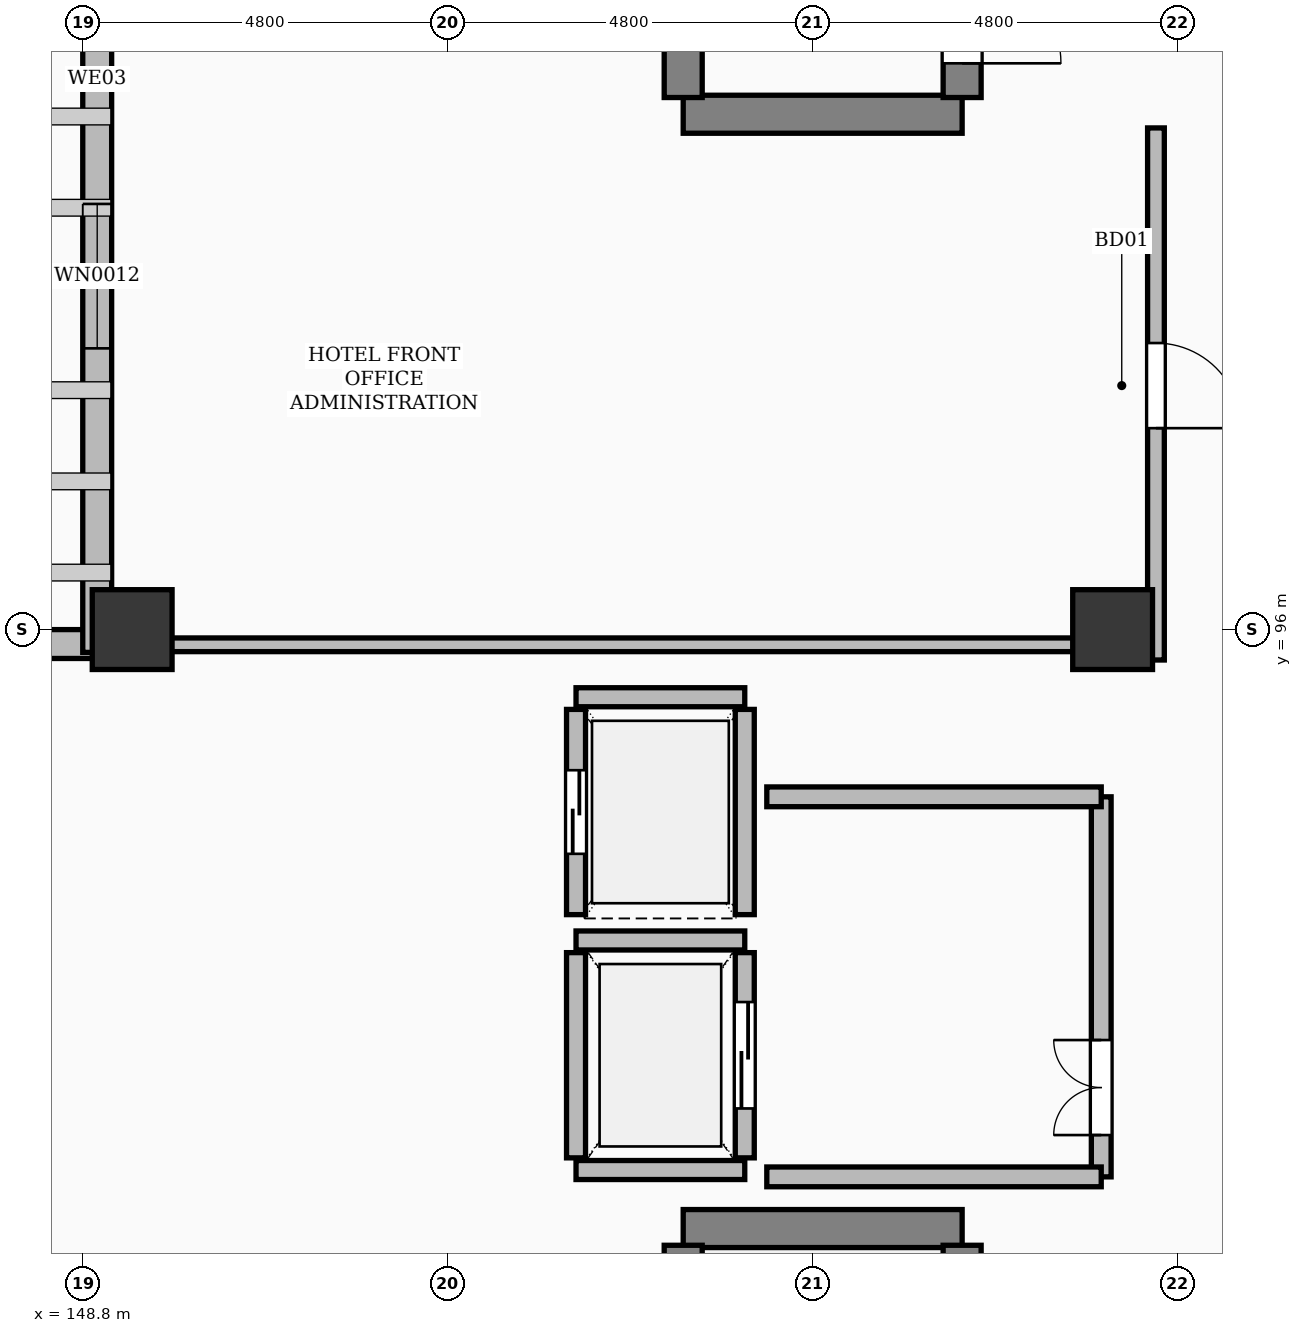
"""IFC4 building model, lengths in metres.
Left out: names, types, materials, properties, quantities, classifications, styles, units other than length and angle.
Written with IfcOpenShell. Run it as: python <this file> out.ifc"""

import sys

from ifc_helpers import new_model, si_unit, direction, frame, frame_2d, origin, origin_2d, place, context, subcontext, project, spatial, rectangle, extrude, element, fill, save


model = new_model("IFC4")
c1 = context("Model", 3, precision=1e-05, world=origin(), true_north=direction((0.0, 1.0)))
c2 = subcontext(c1, "Body", "Model", "MODEL_VIEW")
j1 = project(units=[si_unit("LENGTHUNIT", "METRE"), si_unit("PLANEANGLEUNIT", "RADIAN")], contexts=[c1])
p1 = place(None, origin())
s1 = spatial("IfcSite", under=j1, at=p1, CompositionType="ELEMENT")
p2 = place(p1, origin())
s2 = spatial("IfcBuilding", under=s1, at=p2, CompositionType="ELEMENT")
p3 = place(p2, origin())
s3 = spatial("IfcBuildingStorey", under=s2, at=p3, CompositionType="ELEMENT", Elevation=0.0)
for number, where, z_axis, x_axis in (
    (1, (149.45, 96.0, 0.0), (0.0, 0.0, 1.0), (1.0, 0.0, 0.0)),
    (2, (162.35, 96.0, 0.0), (0.0, 0.0, 1.0), (1.0, 0.0, 0.0)),
):
    element("IfcColumn", number, at=place(p3, frame(where, z_axis=z_axis, x_axis=x_axis)), inside=s3, PredefinedType="COLUMN", context=c2, shape_type="SweptSolid", body=[
        extrude(rectangle(XDim=1.05, YDim=1.05, at=origin_2d()), origin(), (0.0, 0.0, 1.0), 6.0),
    ])
p4 = place(p3, frame((124.8, 95.81, 0.0), z_axis=(0.0, 0.0, 1.0), x_axis=(1.0, 0.0, 0.0)))
e3 = element("IfcWall", 3, at=p4, inside=s3, PredefinedType="SOLIDWALL", context=c2, shape_type="SweptSolid", body=[
    extrude(rectangle(XDim=24.3, YDim=0.38, at=frame_2d((12.15, 0.0))), origin(), (0.0, 0.0, 1.0), 4.692),
])
p5 = place(p4, frame((3.6, 0.0, 0.0)))
e4 = element("IfcOpeningElement", 4, at=p5, cuts=e3, PredefinedType="OPENING", context=c2, shape_type="SweptSolid", body=[
    extrude(rectangle(XDim=2.3, YDim=2.4, at=frame_2d((1.15, 1.2))), frame((0.0, 0.202, 0.0), z_axis=(0.0, -1.0, 0.0), x_axis=(1.0, 0.0, 0.0)), (0.0, 0.0, 1.0), 0.404),
])
p6 = place(p4, frame((16.2, 0.0, 0.0)))
e5 = element("IfcOpeningElement", 5, at=p6, cuts=e3, PredefinedType="OPENING", context=c2, shape_type="SweptSolid", body=[
    extrude(rectangle(XDim=2.3, YDim=2.4, at=frame_2d((1.15, 1.2))), frame((0.0, 0.202, 0.0), z_axis=(0.0, -1.0, 0.0), x_axis=(1.0, 0.0, 0.0)), (0.0, 0.0, 1.0), 0.404),
])
p7 = place(p3, frame((148.99, 95.7, 0.0), z_axis=(0.0, 0.0, 1.0), x_axis=(0.0, 1.0, 0.0)))
e6 = element("IfcWall", 6, at=p7, inside=s3, PredefinedType="SOLIDWALL", context=c2, shape_type="SweptSolid", body=[
    extrude(rectangle(XDim=30.2, YDim=0.38, at=frame_2d((15.1, 0.0))), origin(), (0.0, 0.0, 1.0), 4.692),
])
p8 = place(p7, frame((4.0, 0.0, 0.85)))
e7 = element("IfcOpeningElement", 7, at=p8, cuts=e6, PredefinedType="OPENING", context=c2, shape_type="SweptSolid", body=[
    extrude(rectangle(XDim=1.9, YDim=2.9, at=frame_2d((0.95, 1.45))), frame((0.0, 0.202, 0.0), z_axis=(0.0, -1.0, 0.0), x_axis=(1.0, 0.0, 0.0)), (0.0, 0.0, 1.0), 0.404),
])
p9 = place(p7, frame((13.6, 0.0, 0.85)))
e8 = element("IfcOpeningElement", 8, at=p9, cuts=e6, PredefinedType="OPENING", context=c2, shape_type="SweptSolid", body=[
    extrude(rectangle(XDim=1.9, YDim=2.9, at=frame_2d((0.95, 1.45))), frame((0.0, 0.202, 0.0), z_axis=(0.0, -1.0, 0.0), x_axis=(1.0, 0.0, 0.0)), (0.0, 0.0, 1.0), 0.404),
])
p10 = place(p7, frame((23.2, 0.0, 0.85)))
e9 = element("IfcOpeningElement", 9, at=p10, cuts=e6, PredefinedType="OPENING", context=c2, shape_type="SweptSolid", body=[
    extrude(rectangle(XDim=1.9, YDim=2.9, at=frame_2d((0.95, 1.45))), frame((0.0, 0.202, 0.0), z_axis=(0.0, -1.0, 0.0), x_axis=(1.0, 0.0, 0.0)), (0.0, 0.0, 1.0), 0.404),
])
p11 = place(p3, frame((156.7, 88.12, 0.0), z_axis=(0.0, 0.0, 1.0), x_axis=(1.0, 0.0, 0.0)))
e10 = element("IfcWall", 10, at=p11, inside=s3, PredefinedType="SHEAR", context=c2, shape_type="SweptSolid", body=[
    extrude(rectangle(XDim=3.67, YDim=0.5, at=frame_2d((1.835, 0.0))), origin(), (0.0, 0.0, 1.0), 5.7),
])
p12 = place(p3, frame((156.7, 77.4, 0.0), z_axis=(0.0, 0.0, 1.0), x_axis=(0.0, 1.0, 0.0)))
e11 = element("IfcWall", 11, at=p12, inside=s3, PredefinedType="SHEAR", context=c2, shape_type="SweptSolid", body=[
    extrude(rectangle(XDim=10.5, YDim=0.5, at=frame_2d((5.25, 0.0))), origin(), (0.0, 0.0, 1.0), 5.7),
])
p13 = place(p3, frame((160.37, 77.4, 0.0), z_axis=(0.0, 0.0, 1.0), x_axis=(0.0, 1.0, 0.0)))
e12 = element("IfcWall", 12, at=p13, inside=s3, PredefinedType="SHEAR", context=c2, shape_type="SweptSolid", body=[
    extrude(rectangle(XDim=10.5, YDim=0.5, at=frame_2d((5.25, 0.0))), origin(), (0.0, 0.0, 1.0), 5.7),
])
p14 = place(p13, frame((0.45, 0.0, 0.0)))
e13 = element("IfcOpeningElement", 13, at=p14, cuts=e12, PredefinedType="OPENING", context=c2, shape_type="SweptSolid", body=[
    extrude(rectangle(XDim=1.3, YDim=2.15, at=frame_2d((0.65, 1.075))), frame((0.0, 0.262, 0.0), z_axis=(0.0, -1.0, 0.0), x_axis=(1.0, 0.0, 0.0)), (0.0, 0.0, 1.0), 0.524),
])
for number, where, z_axis, x_axis in (
    (14, (155.29, 88.89, 0.0), (0.0, 0.0, 1.0), (1.0, 0.0, 0.0)),
    (15, (155.29, 91.91, 0.0), (0.0, 0.0, 1.0), (1.0, 0.0, 0.0)),
):
    element("IfcWall", number, at=place(p3, frame(where, z_axis=z_axis, x_axis=x_axis)), inside=s3, PredefinedType="SOLIDWALL", context=c2, shape_type="SweptSolid", body=[
        extrude(rectangle(XDim=2.22, YDim=0.25, at=frame_2d((1.11, 0.0))), origin(), (0.0, 0.0, 1.0), 5.7),
    ])
p15 = place(p3, frame((155.29, 89.05, 0.0), z_axis=(0.0, 0.0, 1.0), x_axis=(0.0, 1.0, 0.0)))
e16 = element("IfcWall", 16, at=p15, inside=s3, PredefinedType="SOLIDWALL", context=c2, shape_type="SweptSolid", body=[
    extrude(rectangle(XDim=2.7, YDim=0.25, at=frame_2d((1.35, 0.0))), origin(), (0.0, 0.0, 1.0), 5.7),
])
p16 = place(p3, frame((157.51, 89.05, 0.0), z_axis=(0.0, 0.0, 1.0), x_axis=(0.0, 1.0, 0.0)))
e17 = element("IfcWall", 17, at=p16, inside=s3, PredefinedType="SOLIDWALL", context=c2, shape_type="SweptSolid", body=[
    extrude(rectangle(XDim=2.7, YDim=0.25, at=frame_2d((1.35, 0.0))), origin(), (0.0, 0.0, 1.0), 5.7),
])
p17 = place(p16, frame((0.65, 0.0, 0.0)))
e18 = element("IfcOpeningElement", 18, at=p17, cuts=e17, PredefinedType="OPENING", context=c2, shape_type="SweptSolid", body=[
    extrude(rectangle(XDim=1.4, YDim=2.3, at=frame_2d((0.7, 1.15))), frame((0.0, 0.137, 0.0), z_axis=(0.0, -1.0, 0.0), x_axis=(1.0, 0.0, 0.0)), (0.0, 0.0, 1.0), 0.274),
])
p18 = place(p3, frame((155.29, 95.11, 0.0), z_axis=(0.0, 0.0, 1.0), x_axis=(1.0, 0.0, 0.0)))
e19 = element("IfcWall", 19, at=p18, inside=s3, PredefinedType="SOLIDWALL", context=c2, shape_type="SweptSolid", body=[
    extrude(rectangle(XDim=2.22, YDim=0.25, at=frame_2d((1.11, 0.0))), origin(), (0.0, 0.0, 1.0), 5.7),
])
p19 = place(p3, frame((155.29, 92.25, 0.0), z_axis=(0.0, 0.0, 1.0), x_axis=(0.0, 1.0, 0.0)))
e20 = element("IfcWall", 20, at=p19, inside=s3, PredefinedType="SOLIDWALL", context=c2, shape_type="SweptSolid", body=[
    extrude(rectangle(XDim=2.7, YDim=0.25, at=frame_2d((1.35, 0.0))), origin(), (0.0, 0.0, 1.0), 5.7),
])
p20 = place(p19, frame((0.8, 0.0, 0.0)))
e21 = element("IfcOpeningElement", 21, at=p20, cuts=e20, PredefinedType="OPENING", context=c2, shape_type="SweptSolid", body=[
    extrude(rectangle(XDim=1.1, YDim=2.2, at=frame_2d((0.55, 1.1))), frame((0.0, 0.137, 0.0), z_axis=(0.0, -1.0, 0.0), x_axis=(1.0, 0.0, 0.0)), (0.0, 0.0, 1.0), 0.274),
])
p21 = place(p3, frame((157.51, 92.25, 0.0), z_axis=(0.0, 0.0, 1.0), x_axis=(0.0, 1.0, 0.0)))
e22 = element("IfcWall", 22, at=p21, inside=s3, PredefinedType="SOLIDWALL", context=c2, shape_type="SweptSolid", body=[
    extrude(rectangle(XDim=2.7, YDim=0.25, at=frame_2d((1.35, 0.0))), origin(), (0.0, 0.0, 1.0), 5.7),
])
p22 = place(p3, frame((162.2, 88.8, 0.0), z_axis=(0.0, 0.0, 1.0), x_axis=(0.0, 1.0, 0.0)))
e23 = element("IfcWall", 23, at=p22, inside=s3, PredefinedType="SOLIDWALL", context=c2, shape_type="SweptSolid", body=[
    extrude(rectangle(XDim=5.0, YDim=0.26, at=frame_2d((2.5, 0.0))), origin(), (0.0, 0.0, 1.0), 4.692),
])
p23 = place(p22, frame((0.55, 0.0, 0.0)))
e24 = element("IfcOpeningElement", 24, at=p23, cuts=e23, PredefinedType="OPENING", context=c2, shape_type="SweptSolid", body=[
    extrude(rectangle(XDim=1.25, YDim=2.15, at=frame_2d((0.625, 1.075))), frame((0.0, 0.142, 0.0), z_axis=(0.0, -1.0, 0.0), x_axis=(1.0, 0.0, 0.0)), (0.0, 0.0, 1.0), 0.284),
])
for number, where, z_axis, x_axis in (
    (25, (157.8, 88.8, 0.0), (0.0, 0.0, 1.0), (1.0, 0.0, 0.0)),
    (26, (157.8, 93.8, 0.0), (0.0, 0.0, 1.0), (1.0, 0.0, 0.0)),
):
    element("IfcWall", number, at=place(p3, frame(where, z_axis=z_axis, x_axis=x_axis)), inside=s3, PredefinedType="SOLIDWALL", context=c2, shape_type="SweptSolid", body=[
        extrude(rectangle(XDim=4.4, YDim=0.26, at=frame_2d((2.2, 0.0))), origin(), (0.0, 0.0, 1.0), 4.692),
    ])
p24 = place(p3, frame((156.7, 102.78, 0.0), z_axis=(0.0, 0.0, 1.0), x_axis=(1.0, 0.0, 0.0)))
e27 = element("IfcWall", 27, at=p24, inside=s3, PredefinedType="SHEAR", context=c2, shape_type="SweptSolid", body=[
    extrude(rectangle(XDim=3.67, YDim=0.5, at=frame_2d((1.835, 0.0))), origin(), (0.0, 0.0, 1.0), 5.7),
])
p25 = place(p3, frame((156.7, 103.0, 0.0), z_axis=(0.0, 0.0, 1.0), x_axis=(0.0, 1.0, 0.0)))
e28 = element("IfcWall", 28, at=p25, inside=s3, PredefinedType="SHEAR", context=c2, shape_type="SweptSolid", body=[
    extrude(rectangle(XDim=10.5, YDim=0.5, at=frame_2d((5.25, 0.0))), origin(), (0.0, 0.0, 1.0), 5.7),
])
p26 = place(p3, frame((160.37, 103.0, 0.0), z_axis=(0.0, 0.0, 1.0), x_axis=(0.0, 1.0, 0.0)))
e29 = element("IfcWall", 29, at=p26, inside=s3, PredefinedType="SHEAR", context=c2, shape_type="SweptSolid", body=[
    extrude(rectangle(XDim=10.5, YDim=0.5, at=frame_2d((5.25, 0.0))), origin(), (0.0, 0.0, 1.0), 5.7),
])
p27 = place(p26, frame((0.45, 0.0, 0.0)))
e30 = element("IfcOpeningElement", 30, at=p27, cuts=e29, PredefinedType="OPENING", context=c2, shape_type="SweptSolid", body=[
    extrude(rectangle(XDim=1.3, YDim=2.15, at=frame_2d((0.65, 1.075))), frame((0.0, 0.262, 0.0), z_axis=(0.0, -1.0, 0.0), x_axis=(1.0, 0.0, 0.0)), (0.0, 0.0, 1.0), 0.524),
])
p28 = place(p3, frame((162.92, 95.6, 0.0), z_axis=(0.0, 0.0, 1.0), x_axis=(0.0, 1.0, 0.0)))
e31 = element("IfcWall", 31, at=p28, inside=s3, PredefinedType="PARTITIONING", context=c2, shape_type="SweptSolid", body=[
    extrude(rectangle(XDim=7.0, YDim=0.22, at=frame_2d((3.5, 0.0))), origin(), (0.0, 0.0, 1.0), 4.692),
])
p29 = place(p28, frame((3.05, 0.0, 0.0)))
e32 = element("IfcOpeningElement", 32, at=p29, cuts=e31, PredefinedType="OPENING", context=c2, shape_type="SweptSolid", body=[
    extrude(rectangle(XDim=1.12, YDim=2.15, at=frame_2d((0.56, 1.075))), frame((0.0, 0.122, 0.0), z_axis=(0.0, -1.0, 0.0), x_axis=(1.0, 0.0, 0.0)), (0.0, 0.0, 1.0), 0.244),
])
p30 = place(p3, frame((149.5, 95.8, 0.0), z_axis=(0.0, 0.0, 1.0), x_axis=(1.0, 0.0, 0.0)))
e33 = element("IfcWall", 33, at=p30, inside=s3, PredefinedType="PARTITIONING", context=c2, shape_type="SweptSolid", body=[
    extrude(rectangle(XDim=13.2, YDim=0.18, at=frame_2d((6.6, 0.0))), origin(), (0.0, 0.0, 1.0), 4.692),
])
p31 = place(p8, origin())
e34 = element("IfcWindow", 34, at=p31, inside=s3, PartitioningType="SINGLE_PANEL", PredefinedType="WINDOW", context=c2, shape_type="SweptSolid", body=[
    extrude(rectangle(XDim=1.9, YDim=2.9, at=frame_2d((0.95, 1.45))), frame((0.0, 0.03, 0.0), z_axis=(0.0, -1.0, 0.0), x_axis=(1.0, 0.0, 0.0)), (0.0, 0.0, 1.0), 0.06),
])
fill(e7, e34)
p32 = place(p17, origin())
e35 = element("IfcDoor", 35, at=p32, inside=s3, OperationType="SLIDING_TO_LEFT", PredefinedType="DOOR", context=c2, shape_type="SweptSolid", body=[
    extrude(rectangle(XDim=1.4, YDim=2.3, at=frame_2d((0.7, 1.15))), frame((0.0, 0.025, 0.0), z_axis=(0.0, -1.0, 0.0), x_axis=(1.0, 0.0, 0.0)), (0.0, 0.0, 1.0), 0.05),
])
fill(e18, e35)
p33 = place(p20, origin())
e36 = element("IfcDoor", 36, at=p33, inside=s3, OperationType="SLIDING_TO_LEFT", PredefinedType="DOOR", context=c2, shape_type="SweptSolid", body=[
    extrude(rectangle(XDim=1.1, YDim=2.2, at=frame_2d((0.55, 1.1))), frame((0.0, 0.025, 0.0), z_axis=(0.0, -1.0, 0.0), x_axis=(1.0, 0.0, 0.0)), (0.0, 0.0, 1.0), 0.05),
])
fill(e21, e36)
p34 = place(p23, origin())
e37 = element("IfcDoor", 37, at=p34, inside=s3, OperationType="DOUBLE_DOOR_SINGLE_SWING", PredefinedType="DOOR", context=c2, shape_type="SweptSolid", body=[
    extrude(rectangle(XDim=1.25, YDim=2.15, at=frame_2d((0.625, 1.075))), frame((0.0, 0.025, 0.0), z_axis=(0.0, -1.0, 0.0), x_axis=(1.0, 0.0, 0.0)), (0.0, 0.0, 1.0), 0.05),
])
fill(e24, e37)
p35 = place(p27, frame((1.3, 0.0, 0.0), z_axis=(0.0, 0.0, 1.0), x_axis=(-1.0, 0.0, 0.0)))
e38 = element("IfcDoor", 38, at=p35, inside=s3, OperationType="SINGLE_SWING_LEFT", PredefinedType="DOOR", context=c2, shape_type="SweptSolid", body=[
    extrude(rectangle(XDim=1.3, YDim=2.15, at=frame_2d((0.65, 1.075))), frame((0.0, 0.025, 0.0), z_axis=(0.0, -1.0, 0.0), x_axis=(1.0, 0.0, 0.0)), (0.0, 0.0, 1.0), 0.05),
])
fill(e30, e38)
p36 = place(p29, frame((1.12, 0.0, 0.0), z_axis=(0.0, 0.0, 1.0), x_axis=(-1.0, 0.0, 0.0)))
e39 = element("IfcDoor", 39, at=p36, inside=s3, OperationType="SINGLE_SWING_LEFT", PredefinedType="DOOR", context=c2, shape_type="SweptSolid", body=[
    extrude(rectangle(XDim=1.12, YDim=2.15, at=frame_2d((0.56, 1.075))), frame((0.0, 0.025, 0.0), z_axis=(0.0, -1.0, 0.0), x_axis=(1.0, 0.0, 0.0)), (0.0, 0.0, 1.0), 0.05),
])
fill(e32, e39)
save(model, sys.argv[1])
